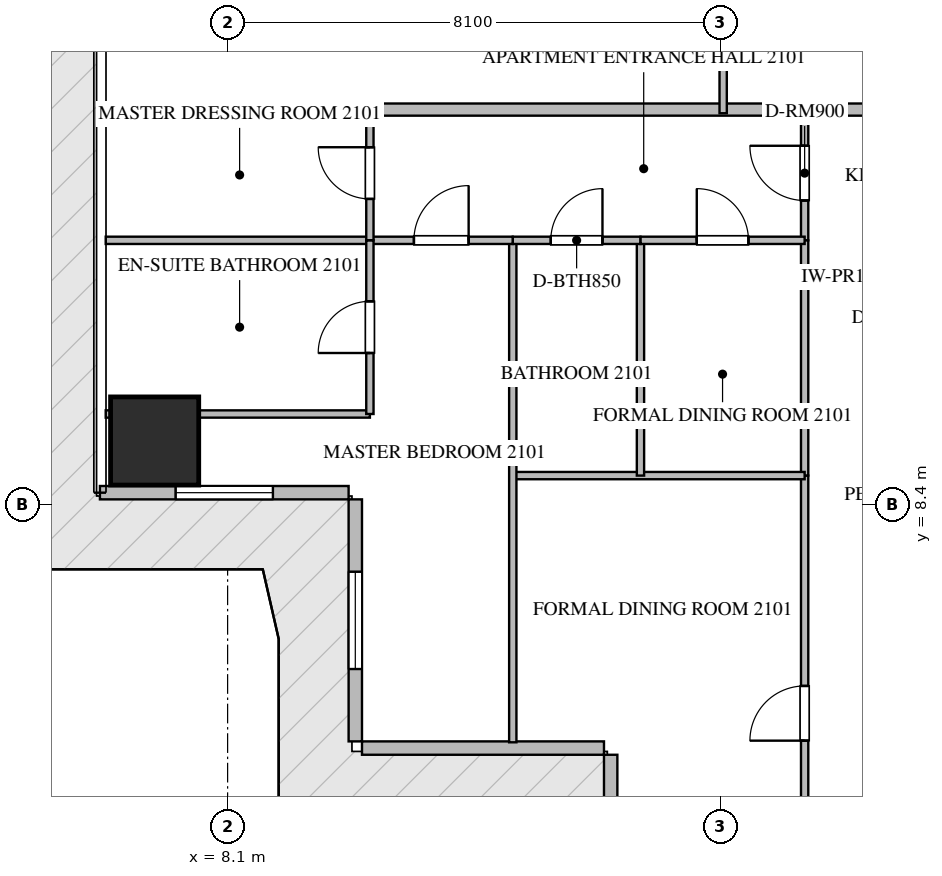
"""IFC4 building model, lengths in metres.
Left out: names, types, materials, properties, quantities, classifications, styles, units other than length and angle.
Written with IfcOpenShell. Run it as: python <this file> out.ifc"""

import sys

from ifc_helpers import new_model, si_unit, direction, frame, frame_2d, origin, origin_2d, place, context, subcontext, project, spatial, rectangle, extrude, source, transform, mapped, element, fill, save


model = new_model("IFC4")
c1 = context("Model", 3, precision=1e-05, world=origin(), true_north=direction((0.0, 1.0)))
c2 = subcontext(c1, "Body", "Model", "MODEL_VIEW")
j1 = project(units=[si_unit("LENGTHUNIT", "METRE"), si_unit("PLANEANGLEUNIT", "RADIAN")], contexts=[c1])
p1 = place(None, origin())
s1 = spatial("IfcSite", under=j1, at=p1, CompositionType="ELEMENT")
p2 = place(p1, origin())
s2 = spatial("IfcBuilding", under=s1, at=p2, CompositionType="ELEMENT")
p3 = place(p2, frame((0.0, 0.0, 86.7)))
s3 = spatial("IfcBuildingStorey", under=s2, at=p3, CompositionType="ELEMENT", Elevation=86.7)
m1 = source(origin(), c2, "Body", "SweptSolid", [
    extrude(rectangle(XDim=1.45, YDim=1.45, at=origin_2d()), origin(), (0.0, 0.0, 1.0), 3.75),
])
p4 = place(p3, frame((6.9, 9.45, -0.26), z_axis=(0.0, 0.0, 1.0), x_axis=(1.0, 0.0, 0.0)))
e1 = element("IfcColumn", 1, at=p4, inside=s3, PredefinedType="COLUMN", context=c2, shape_type="MappedRepresentation", body=[
    mapped(m1, transform((0.0, 0.0, 0.0), scale=1.0)),
])
p5 = place(p3, frame((6.0, 8.6, 0.0), z_axis=(0.0, 0.0, 1.0), x_axis=(1.0, 0.0, 0.0)))
e2 = element("IfcWall", 2, at=p5, inside=s3, PredefinedType="ELEMENTEDWALL", context=c2, shape_type="SweptSolid", body=[
    extrude(rectangle(XDim=4.09, YDim=0.22, at=frame_2d((2.045, 0.0))), origin(), (0.0, 0.0, 1.0), 3.475),
])
p6 = place(p5, frame((1.245, 0.0, 0.65)))
e3 = element("IfcOpeningElement", 3, at=p6, cuts=e2, PredefinedType="OPENING", context=c2, shape_type="SweptSolid", body=[
    extrude(rectangle(XDim=1.6, YDim=2.1, at=frame_2d((0.8, 1.05))), frame((0.0, 0.12, 0.0), z_axis=(0.0, -1.0, 0.0), x_axis=(1.0, 0.0, 0.0)), (0.0, 0.0, 1.0), 0.24),
])
p7 = place(p3, frame((10.2, 8.49, 0.0), z_axis=(0.0, 0.0, 1.0), x_axis=(0.0, -1.0, 0.0)))
e4 = element("IfcWall", 4, at=p7, inside=s3, PredefinedType="ELEMENTEDWALL", context=c2, shape_type="SweptSolid", body=[
    extrude(rectangle(XDim=3.98, YDim=0.22, at=frame_2d((1.99, 0.0))), origin(), (0.0, 0.0, 1.0), 3.475),
])
p8 = place(p7, frame((1.19, 0.0, 0.65)))
e5 = element("IfcOpeningElement", 5, at=p8, cuts=e4, PredefinedType="OPENING", context=c2, shape_type="SweptSolid", body=[
    extrude(rectangle(XDim=1.6, YDim=2.1, at=frame_2d((0.8, 1.05))), frame((0.0, 0.12, 0.0), z_axis=(0.0, -1.0, 0.0), x_axis=(1.0, 0.0, 0.0)), (0.0, 0.0, 1.0), 0.24),
])
p9 = place(p3, frame((10.31, 4.4, 0.0), z_axis=(0.0, 0.0, 1.0), x_axis=(1.0, 0.0, 0.0)))
e6 = element("IfcWall", 6, at=p9, inside=s3, PredefinedType="ELEMENTEDWALL", context=c2, shape_type="SweptSolid", body=[
    extrude(rectangle(XDim=3.98, YDim=0.22, at=frame_2d((1.99, 0.0))), origin(), (0.0, 0.0, 1.0), 3.475),
])
p10 = place(p3, frame((14.4, 4.29, 0.0), z_axis=(0.0, 0.0, 1.0), x_axis=(0.0, -1.0, 0.0)))
e7 = element("IfcWall", 7, at=p10, inside=s3, PredefinedType="ELEMENTEDWALL", context=c2, shape_type="SweptSolid", body=[
    extrude(rectangle(XDim=4.09, YDim=0.22, at=frame_2d((2.045, 0.0))), origin(), (0.0, 0.0, 1.0), 3.475),
])
p11 = place(p10, frame((1.245, 0.0, 0.65)))
e8 = element("IfcOpeningElement", 8, at=p11, cuts=e7, PredefinedType="OPENING", context=c2, shape_type="SweptSolid", body=[
    extrude(rectangle(XDim=1.6, YDim=2.1, at=frame_2d((0.8, 1.05))), frame((0.0, 0.12, 0.0), z_axis=(0.0, -1.0, 0.0), x_axis=(1.0, 0.0, 0.0)), (0.0, 0.0, 1.0), 0.24),
])
p12 = place(p3, frame((6.082, 14.9, 0.0), z_axis=(0.0, 0.0, 1.0), x_axis=(1.0, 0.0, 0.0)))
e9 = element("IfcWall", 9, at=p12, inside=s3, PredefinedType="PARTITIONING", context=c2, shape_type="SweptSolid", body=[
    extrude(rectangle(XDim=15.318, YDim=0.2, at=frame_2d((7.659, 0.0))), origin(), (0.0, 0.0, 1.0), 3.49),
])
p13 = place(p3, frame((17.59, 12.15, 0.0), z_axis=(0.0, 0.0, 1.0), x_axis=(1.0, 0.0, 0.0)))
e10 = element("IfcWall", 10, at=p13, inside=s3, PredefinedType="PARTITIONING", context=c2, shape_type="SweptSolid", body=[
    extrude(rectangle(XDim=2.85, YDim=0.12, at=frame_2d((1.425, 0.0))), origin(), (0.0, 0.0, 1.0), 3.49),
])
p14 = place(p13, frame((1.0, 0.0, 0.0)))
e11 = element("IfcOpeningElement", 11, at=p14, cuts=e10, PredefinedType="OPENING", context=c2, shape_type="SweptSolid", body=[
    extrude(rectangle(XDim=0.85, YDim=2.1, at=frame_2d((0.425, 1.05))), frame((0.0, 0.07, 0.0), z_axis=(0.0, -1.0, 0.0), x_axis=(1.0, 0.0, 0.0)), (0.0, 0.0, 1.0), 0.14),
])
p15 = place(p3, frame((17.59, 12.75, 0.0), z_axis=(0.0, 0.0, 1.0), x_axis=(0.0, 1.0, 0.0)))
e12 = element("IfcWall", 12, at=p15, inside=s3, PredefinedType="PARTITIONING", context=c2, shape_type="SweptSolid", body=[
    extrude(rectangle(XDim=2.21, YDim=0.12, at=frame_2d((1.105, 0.0))), origin(), (0.0, 0.0, 1.0), 3.49),
])
p16 = place(p15, frame((0.655, 0.0, 0.0)))
e13 = element("IfcOpeningElement", 13, at=p16, cuts=e12, PredefinedType="OPENING", context=c2, shape_type="SweptSolid", body=[
    extrude(rectangle(XDim=0.9, YDim=2.1, at=frame_2d((0.45, 1.05))), frame((0.0, 0.07, 0.0), z_axis=(0.0, -1.0, 0.0), x_axis=(1.0, 0.0, 0.0)), (0.0, 0.0, 1.0), 0.14),
])
p17 = place(p3, frame((17.59, 0.295, 0.0), z_axis=(0.0, 0.0, 1.0), x_axis=(0.0, 1.0, 0.0)))
e14 = element("IfcWall", 14, at=p17, inside=s3, PredefinedType="PARTITIONING", context=c2, shape_type="SweptSolid", body=[
    extrude(rectangle(XDim=8.586, YDim=0.12, at=frame_2d((4.293, 0.0))), origin(), (0.0, 0.0, 1.0), 3.49),
])
p18 = place(p17, frame((4.227, 0.0, 0.0)))
e15 = element("IfcOpeningElement", 15, at=p18, cuts=e14, PredefinedType="OPENING", context=c2, shape_type="SweptSolid", body=[
    extrude(rectangle(XDim=0.9, YDim=2.1, at=frame_2d((0.45, 1.05))), frame((0.0, 0.07, 0.0), z_axis=(0.0, -1.0, 0.0), x_axis=(1.0, 0.0, 0.0)), (0.0, 0.0, 1.0), 0.14),
])
p19 = place(p3, frame((17.59, 8.883, 0.0), z_axis=(0.0, 0.0, 1.0), x_axis=(0.0, 1.0, 0.0)))
e16 = element("IfcWall", 16, at=p19, inside=s3, PredefinedType="PARTITIONING", context=c2, shape_type="SweptSolid", body=[
    extrude(rectangle(XDim=3.865, YDim=0.12, at=frame_2d((1.933, 0.0))), origin(), (0.0, 0.0, 1.0), 3.49),
])
p20 = place(p3, frame((12.79, 8.881, 0.0), z_axis=(0.0, 0.0, 1.0), x_axis=(1.0, 0.0, 0.0)))
e17 = element("IfcWall", 17, at=p20, inside=s3, PredefinedType="PARTITIONING", context=c2, shape_type="SweptSolid", body=[
    extrude(rectangle(XDim=4.8, YDim=0.12, at=frame_2d((2.4, 0.0))), origin(), (0.0, 0.0, 1.0), 3.49),
])
p21 = place(p3, frame((12.79, 4.495, 0.0), z_axis=(0.0, 0.0, 1.0), x_axis=(0.0, 1.0, 0.0)))
e18 = element("IfcWall", 18, at=p21, inside=s3, PredefinedType="PARTITIONING", context=c2, shape_type="SweptSolid", body=[
    extrude(rectangle(XDim=8.255, YDim=0.12, at=frame_2d((4.127, 0.0))), origin(), (0.0, 0.0, 1.0), 3.49),
])
p22 = place(p3, frame((14.89, 8.881, 0.0), z_axis=(0.0, 0.0, 1.0), x_axis=(0.0, 1.0, 0.0)))
e19 = element("IfcWall", 19, at=p22, inside=s3, PredefinedType="PARTITIONING", context=c2, shape_type="SweptSolid", body=[
    extrude(rectangle(XDim=3.869, YDim=0.12, at=frame_2d((1.935, 0.0))), origin(), (0.0, 0.0, 1.0), 3.49),
])
p23 = place(p3, frame((12.79, 12.75, 0.0), z_axis=(0.0, 0.0, 1.0), x_axis=(1.0, 0.0, 0.0)))
e20 = element("IfcWall", 20, at=p23, inside=s3, PredefinedType="PARTITIONING", context=c2, shape_type="SweptSolid", body=[
    extrude(rectangle(XDim=2.1, YDim=0.12, at=frame_2d((1.05, 0.0))), origin(), (0.0, 0.0, 1.0), 3.49),
])
p24 = place(p23, frame((0.625, 0.0, 0.0)))
e21 = element("IfcOpeningElement", 21, at=p24, cuts=e20, PredefinedType="OPENING", context=c2, shape_type="SweptSolid", body=[
    extrude(rectangle(XDim=0.85, YDim=2.1, at=frame_2d((0.425, 1.05))), frame((0.0, 0.07, 0.0), z_axis=(0.0, -1.0, 0.0), x_axis=(1.0, 0.0, 0.0)), (0.0, 0.0, 1.0), 0.14),
])
p25 = place(p3, frame((14.892, 12.75, 0.0), z_axis=(0.0, 0.0, 1.0), x_axis=(1.0, 0.0, 0.0)))
e22 = element("IfcWall", 22, at=p25, inside=s3, PredefinedType="PARTITIONING", context=c2, shape_type="SweptSolid", body=[
    extrude(rectangle(XDim=2.698, YDim=0.12, at=frame_2d((1.349, 0.0))), origin(), (0.0, 0.0, 1.0), 3.49),
])
p26 = place(p25, frame((0.924, 0.0, 0.0)))
e23 = element("IfcOpeningElement", 23, at=p26, cuts=e22, PredefinedType="OPENING", context=c2, shape_type="SweptSolid", body=[
    extrude(rectangle(XDim=0.85, YDim=2.1, at=frame_2d((0.425, 1.05))), frame((0.0, 0.07, 0.0), z_axis=(0.0, -1.0, 0.0), x_axis=(1.0, 0.0, 0.0)), (0.0, 0.0, 1.0), 0.14),
])
p27 = place(p3, frame((10.44, 12.75, 0.0), z_axis=(0.0, 0.0, 1.0), x_axis=(1.0, 0.0, 0.0)))
e24 = element("IfcWall", 24, at=p27, inside=s3, PredefinedType="PARTITIONING", context=c2, shape_type="SweptSolid", body=[
    extrude(rectangle(XDim=2.348, YDim=0.12, at=frame_2d((1.174, 0.0))), origin(), (0.0, 0.0, 1.0), 3.49),
])
p28 = place(p27, frame((0.724, 0.0, 0.0)))
e25 = element("IfcOpeningElement", 25, at=p28, cuts=e24, PredefinedType="OPENING", context=c2, shape_type="SweptSolid", body=[
    extrude(rectangle(XDim=0.9, YDim=2.1, at=frame_2d((0.45, 1.05))), frame((0.0, 0.07, 0.0), z_axis=(0.0, -1.0, 0.0), x_axis=(1.0, 0.0, 0.0)), (0.0, 0.0, 1.0), 0.14),
])
p29 = place(p3, frame((6.095, 9.894, 0.0), z_axis=(0.0, 0.0, 1.0), x_axis=(1.0, 0.0, 0.0)))
e26 = element("IfcWall", 26, at=p29, inside=s3, PredefinedType="PARTITIONING", context=c2, shape_type="SweptSolid", body=[
    extrude(rectangle(XDim=4.345, YDim=0.12, at=frame_2d((2.172, 0.0))), origin(), (0.0, 0.0, 1.0), 3.49),
])
p30 = place(p3, frame((6.095, 12.75, 0.0), z_axis=(0.0, 0.0, 1.0), x_axis=(1.0, 0.0, 0.0)))
e27 = element("IfcWall", 27, at=p30, inside=s3, PredefinedType="PARTITIONING", context=c2, shape_type="SweptSolid", body=[
    extrude(rectangle(XDim=4.343, YDim=0.12, at=frame_2d((2.171, 0.0))), origin(), (0.0, 0.0, 1.0), 3.49),
])
p31 = place(p3, frame((10.44, 9.894, 0.0), z_axis=(0.0, 0.0, 1.0), x_axis=(0.0, 1.0, 0.0)))
e28 = element("IfcWall", 28, at=p31, inside=s3, PredefinedType="PARTITIONING", context=c2, shape_type="SweptSolid", body=[
    extrude(rectangle(XDim=2.856, YDim=0.12, at=frame_2d((1.428, 0.0))), origin(), (0.0, 0.0, 1.0), 3.49),
])
p32 = place(p31, frame((1.003, 0.0, 0.0)))
e29 = element("IfcOpeningElement", 29, at=p32, cuts=e28, PredefinedType="OPENING", context=c2, shape_type="SweptSolid", body=[
    extrude(rectangle(XDim=0.85, YDim=2.1, at=frame_2d((0.425, 1.05))), frame((0.0, 0.07, 0.0), z_axis=(0.0, -1.0, 0.0), x_axis=(1.0, 0.0, 0.0)), (0.0, 0.0, 1.0), 0.14),
])
p33 = place(p3, frame((10.44, 12.752, 0.0), z_axis=(0.0, 0.0, 1.0), x_axis=(0.0, 1.0, 0.0)))
e30 = element("IfcWall", 30, at=p33, inside=s3, PredefinedType="PARTITIONING", context=c2, shape_type="SweptSolid", body=[
    extrude(rectangle(XDim=2.208, YDim=0.12, at=frame_2d((1.104, 0.0))), origin(), (0.0, 0.0, 1.0), 3.49),
])
p34 = place(p33, frame((0.679, 0.0, 0.0)))
e31 = element("IfcOpeningElement", 31, at=p34, cuts=e30, PredefinedType="OPENING", context=c2, shape_type="SweptSolid", body=[
    extrude(rectangle(XDim=0.85, YDim=2.1, at=frame_2d((0.425, 1.05))), frame((0.0, 0.07, 0.0), z_axis=(0.0, -1.0, 0.0), x_axis=(1.0, 0.0, 0.0)), (0.0, 0.0, 1.0), 0.14),
])
p35 = place(p3, frame((16.25, 14.84, 0.0), z_axis=(0.0, 0.0, 1.0), x_axis=(0.0, 1.0, 0.0)))
e32 = element("IfcWall", 32, at=p35, inside=s3, PredefinedType="PARTITIONING", context=c2, shape_type="SweptSolid", body=[
    extrude(rectangle(XDim=2.81, YDim=0.12, at=frame_2d((1.405, 0.0))), origin(), (0.0, 0.0, 1.0), 3.49),
])
m2 = source(origin(), c2, "Body", "SweptSolid", [
    extrude(rectangle(XDim=1.6, YDim=2.1, at=frame_2d((0.8, 1.05))), frame((0.0, 0.03, 0.0), z_axis=(0.0, -1.0, 0.0), x_axis=(1.0, 0.0, 0.0)), (0.0, 0.0, 1.0), 0.06),
])
p36 = place(p6, origin())
e33 = element("IfcWindow", 33, at=p36, inside=s3, PartitioningType="SINGLE_PANEL", PredefinedType="WINDOW", context=c2, shape_type="MappedRepresentation", body=[
    mapped(m2, transform((0.0, 0.0, 0.0), scale=1.0)),
])
fill(e3, e33)
p37 = place(p8, origin())
e34 = element("IfcWindow", 34, at=p37, inside=s3, PartitioningType="SINGLE_PANEL", PredefinedType="WINDOW", context=c2, shape_type="MappedRepresentation", body=[
    mapped(m2, transform((0.0, 0.0, 0.0), scale=1.0)),
])
fill(e5, e34)
m3 = source(origin(), c2, "Body", "SweptSolid", [
    extrude(rectangle(XDim=0.9, YDim=2.1, at=frame_2d((0.45, 1.05))), frame((0.0, 0.025, 0.0), z_axis=(0.0, -1.0, 0.0), x_axis=(1.0, 0.0, 0.0)), (0.0, 0.0, 1.0), 0.05),
])
p38 = place(p16, origin())
e35 = element("IfcDoor", 35, at=p38, inside=s3, OperationType="SINGLE_SWING_RIGHT", PredefinedType="DOOR", context=c2, shape_type="MappedRepresentation", body=[
    mapped(m3, transform((0.0, 0.0, 0.0), scale=1.0)),
])
fill(e13, e35)
p39 = place(p18, origin())
e36 = element("IfcDoor", 36, at=p39, inside=s3, OperationType="SINGLE_SWING_LEFT", PredefinedType="DOOR", context=c2, shape_type="MappedRepresentation", body=[
    mapped(m3, transform((0.0, 0.0, 0.0), scale=1.0)),
])
fill(e15, e36)
m4 = source(origin(), c2, "Body", "SweptSolid", [
    extrude(rectangle(XDim=0.85, YDim=2.1, at=frame_2d((0.425, 1.05))), frame((0.0, 0.025, 0.0), z_axis=(0.0, -1.0, 0.0), x_axis=(1.0, 0.0, 0.0)), (0.0, 0.0, 1.0), 0.05),
])
p40 = place(p24, origin())
e37 = element("IfcDoor", 37, at=p40, inside=s3, OperationType="SINGLE_SWING_RIGHT", PredefinedType="DOOR", context=c2, shape_type="MappedRepresentation", body=[
    mapped(m4, transform((0.0, 0.0, 0.0), scale=1.0)),
])
fill(e21, e37)
p41 = place(p26, origin())
e38 = element("IfcDoor", 38, at=p41, inside=s3, OperationType="SINGLE_SWING_LEFT", PredefinedType="DOOR", context=c2, shape_type="MappedRepresentation", body=[
    mapped(m4, transform((0.0, 0.0, 0.0), scale=1.0)),
])
fill(e23, e38)
p42 = place(p28, origin())
e39 = element("IfcDoor", 39, at=p42, inside=s3, OperationType="SINGLE_SWING_RIGHT", PredefinedType="DOOR", context=c2, shape_type="MappedRepresentation", body=[
    mapped(m3, transform((0.0, 0.0, 0.0), scale=1.0)),
])
fill(e25, e39)
p43 = place(p32, origin())
e40 = element("IfcDoor", 40, at=p43, inside=s3, OperationType="SINGLE_SWING_LEFT", PredefinedType="DOOR", context=c2, shape_type="MappedRepresentation", body=[
    mapped(m4, transform((0.0, 0.0, 0.0), scale=1.0)),
])
fill(e29, e40)
p44 = place(p34, origin())
e41 = element("IfcDoor", 41, at=p44, inside=s3, OperationType="SINGLE_SWING_RIGHT", PredefinedType="DOOR", context=c2, shape_type="MappedRepresentation", body=[
    mapped(m4, transform((0.0, 0.0, 0.0), scale=1.0)),
])
fill(e31, e41)
save(model, sys.argv[1])
